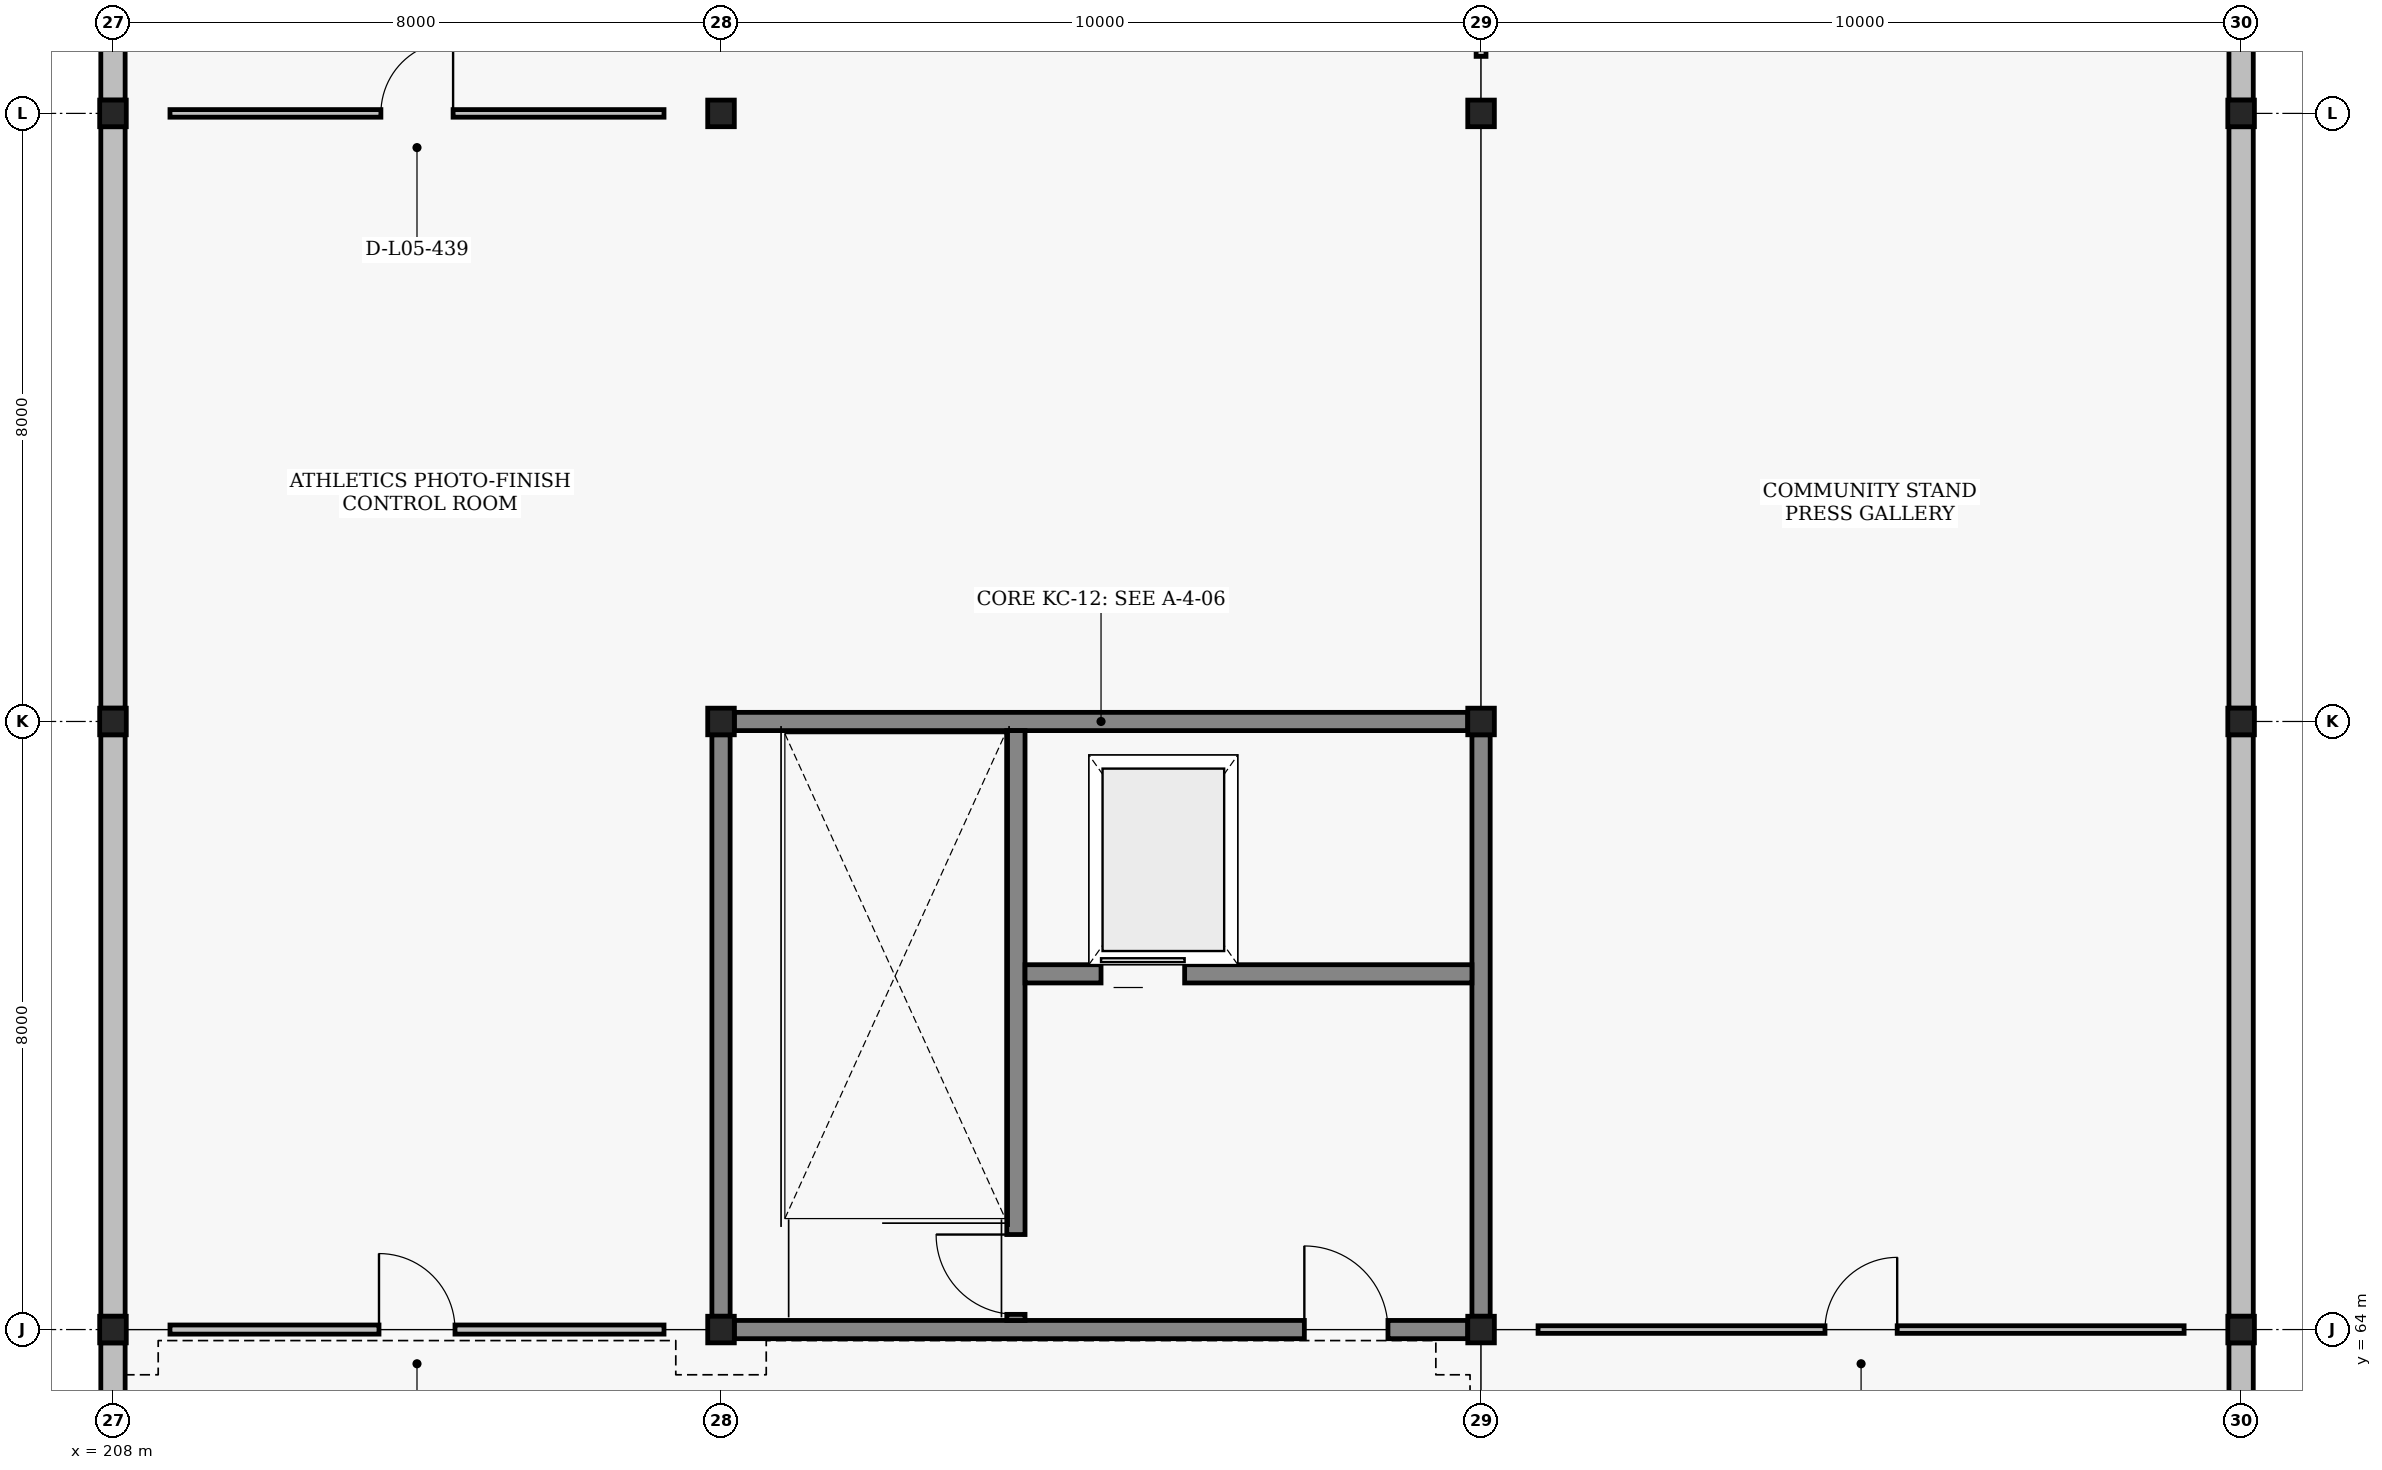
"""IFC4 building model, lengths in metres.
Left out: names, types, materials, properties, quantities, classifications, styles, units other than length and angle.
Written with IfcOpenShell. Run it as: python <this file> out.ifc"""

import sys

from ifc_helpers import new_model, si_unit, direction, frame, frame_2d, origin, origin_2d, place, context, subcontext, project, spatial, rectangle, hollow_rectangle, extrude, element, fill, save


model = new_model("IFC4")
c1 = context("Model", 3, precision=1e-05, world=origin(), true_north=direction((0.0, 1.0)))
c2 = subcontext(c1, "Body", "Model", "MODEL_VIEW")
j1 = project(units=[si_unit("LENGTHUNIT", "METRE"), si_unit("PLANEANGLEUNIT", "RADIAN")], contexts=[c1])
p1 = place(None, origin())
s1 = spatial("IfcSite", under=j1, at=p1, CompositionType="ELEMENT")
p2 = place(p1, origin())
s2 = spatial("IfcBuilding", under=s1, at=p2, CompositionType="ELEMENT")
p3 = place(p2, frame((0.0, 0.0, 18.6)))
s3 = spatial("IfcBuildingStorey", under=s2, at=p3, CompositionType="ELEMENT", Elevation=18.6)
for number, where, z_axis, x_axis in (
    (1, (208.0, 64.0, 0.0), (0.0, 0.0, 1.0), (1.0, 0.0, 0.0)),
    (2, (208.0, 72.0, 0.0), (0.0, 0.0, 1.0), (1.0, 0.0, 0.0)),
    (3, (208.0, 80.0, 0.0), (0.0, 0.0, 1.0), (1.0, 0.0, 0.0)),
    (4, (216.0, 64.0, 0.0), (0.0, 0.0, 1.0), (1.0, 0.0, 0.0)),
    (5, (216.0, 72.0, 0.0), (0.0, 0.0, 1.0), (1.0, 0.0, 0.0)),
    (6, (216.0, 80.0, 0.0), (0.0, 0.0, 1.0), (1.0, 0.0, 0.0)),
    (7, (226.0, 64.0, 0.0), (0.0, 0.0, 1.0), (1.0, 0.0, 0.0)),
    (8, (226.0, 72.0, 0.0), (0.0, 0.0, 1.0), (1.0, 0.0, 0.0)),
    (9, (226.0, 80.0, 0.0), (0.0, 0.0, 1.0), (1.0, 0.0, 0.0)),
    (10, (236.0, 64.0, 0.0), (0.0, 0.0, 1.0), (1.0, 0.0, 0.0)),
    (11, (236.0, 72.0, 0.0), (0.0, 0.0, 1.0), (1.0, 0.0, 0.0)),
    (12, (236.0, 80.0, 0.0), (0.0, 0.0, 1.0), (1.0, 0.0, 0.0)),
):
    element("IfcColumn", number, at=place(p3, frame(where, z_axis=z_axis, x_axis=x_axis)), inside=s3, PredefinedType="COLUMN", context=c2, shape_type="SweptSolid", body=[
        extrude(hollow_rectangle(XDim=0.35, YDim=0.35, WallThickness=0.016, at=origin_2d()), origin(), (0.0, 0.0, 1.0), 4.2),
    ])
for number, where, z_axis, x_axis in (
    (13, (208.0, 56.175, 0.0), (0.0, 0.0, 1.0), (0.0, 1.0, 0.0)),
    (14, (208.0, 64.175, 0.0), (0.0, 0.0, 1.0), (0.0, 1.0, 0.0)),
    (15, (208.0, 72.175, 0.0), (0.0, 0.0, 1.0), (0.0, 1.0, 0.0)),
    (16, (208.0, 80.175, 0.0), (0.0, 0.0, 1.0), (0.0, 1.0, 0.0)),
):
    element("IfcWall", number, at=place(p3, frame(where, z_axis=z_axis, x_axis=x_axis)), inside=s3, PredefinedType="SOLIDWALL", context=c2, shape_type="SweptSolid", body=[
        extrude(rectangle(XDim=7.65, YDim=0.32, at=frame_2d((3.825, 0.0))), origin(), (0.0, 0.0, 1.0), 3.35),
    ])
for number, where, z_axis, x_axis in (
    (17, (236.0, 56.175, 0.0), (0.0, 0.0, 1.0), (0.0, 1.0, 0.0)),
    (18, (236.0, 64.175, 0.0), (0.0, 0.0, 1.0), (0.0, 1.0, 0.0)),
    (19, (236.0, 72.175, 0.0), (0.0, 0.0, 1.0), (0.0, 1.0, 0.0)),
    (20, (236.0, 80.175, 0.0), (0.0, 0.0, 1.0), (0.0, 1.0, 0.0)),
):
    element("IfcWall", number, at=place(p3, frame(where, z_axis=z_axis, x_axis=x_axis)), inside=s3, PredefinedType="SOLIDWALL", context=c2, shape_type="SweptSolid", body=[
        extrude(rectangle(XDim=7.65, YDim=0.32, at=frame_2d((3.825, 0.0))), origin(), (0.0, 0.0, 1.0), 3.27),
    ])
p4 = place(p3, frame((216.175, 64.0, 0.0), z_axis=(0.0, 0.0, 1.0), x_axis=(1.0, 0.0, 0.0)))
e21 = element("IfcWall", 21, at=p4, inside=s3, PredefinedType="SHEAR", context=c2, shape_type="SweptSolid", body=[
    extrude(rectangle(XDim=9.65, YDim=0.24, at=frame_2d((4.825, 0.0))), origin(), (0.0, 0.0, 1.0), 3.27),
])
p5 = place(p4, frame((7.5, 0.0, 0.0)))
e22 = element("IfcOpeningElement", 22, at=p5, cuts=e21, PredefinedType="OPENING", context=c2, shape_type="SweptSolid", body=[
    extrude(rectangle(XDim=1.1, YDim=2.2, at=frame_2d((0.55, 1.1))), frame((0.0, 0.13, 0.0), z_axis=(0.0, -1.0, 0.0), x_axis=(1.0, 0.0, 0.0)), (0.0, 0.0, 1.0), 0.26),
])
p6 = place(p3, frame((216.175, 72.0, 0.0), z_axis=(0.0, 0.0, 1.0), x_axis=(1.0, 0.0, 0.0)))
e23 = element("IfcWall", 23, at=p6, inside=s3, PredefinedType="SHEAR", context=c2, shape_type="SweptSolid", body=[
    extrude(rectangle(XDim=9.65, YDim=0.24, at=frame_2d((4.825, 0.0))), origin(), (0.0, 0.0, 1.0), 3.27),
])
p7 = place(p3, frame((216.0, 64.175, 0.0), z_axis=(0.0, 0.0, 1.0), x_axis=(0.0, 1.0, 0.0)))
e24 = element("IfcWall", 24, at=p7, inside=s3, PredefinedType="SHEAR", context=c2, shape_type="SweptSolid", body=[
    extrude(rectangle(XDim=7.65, YDim=0.24, at=frame_2d((3.825, 0.0))), origin(), (0.0, 0.0, 1.0), 3.37),
])
p8 = place(p3, frame((226.0, 64.175, 0.0), z_axis=(0.0, 0.0, 1.0), x_axis=(0.0, 1.0, 0.0)))
e25 = element("IfcWall", 25, at=p8, inside=s3, PredefinedType="SHEAR", context=c2, shape_type="SweptSolid", body=[
    extrude(rectangle(XDim=7.65, YDim=0.24, at=frame_2d((3.825, 0.0))), origin(), (0.0, 0.0, 1.0), 3.27),
])
p9 = place(p3, frame((219.88, 64.12, 0.0), z_axis=(0.0, 0.0, 1.0), x_axis=(0.0, 1.0, 0.0)))
e26 = element("IfcWall", 26, at=p9, inside=s3, PredefinedType="SHEAR", context=c2, shape_type="SweptSolid", body=[
    extrude(rectangle(XDim=7.76, YDim=0.24, at=frame_2d((3.88, 0.0))), origin(), (0.0, 0.0, 1.0), 3.47),
])
p10 = place(p9, frame((0.08, 0.0, 0.0)))
e27 = element("IfcOpeningElement", 27, at=p10, cuts=e26, PredefinedType="OPENING", context=c2, shape_type="SweptSolid", body=[
    extrude(rectangle(XDim=1.05, YDim=2.15, at=frame_2d((0.525, 1.075))), frame((0.0, 0.13, 0.0), z_axis=(0.0, -1.0, 0.0), x_axis=(1.0, 0.0, 0.0)), (0.0, 0.0, 1.0), 0.26),
])
p11 = place(p3, frame((220.0, 68.68, 0.0), z_axis=(0.0, 0.0, 1.0), x_axis=(1.0, 0.0, 0.0)))
e28 = element("IfcWall", 28, at=p11, inside=s3, PredefinedType="SHEAR", context=c2, shape_type="SweptSolid", body=[
    extrude(rectangle(XDim=5.88, YDim=0.24, at=frame_2d((2.94, 0.0))), origin(), (0.0, 0.0, 1.0), 3.37),
])
p12 = place(p11, frame((1.0, 0.0, 0.0)))
e29 = element("IfcOpeningElement", 29, at=p12, cuts=e28, PredefinedType="OPENING", context=c2, shape_type="SweptSolid", body=[
    extrude(rectangle(XDim=1.1, YDim=2.15, at=frame_2d((0.55, 1.075))), frame((0.0, 0.13, 0.0), z_axis=(0.0, -1.0, 0.0), x_axis=(1.0, 0.0, 0.0)), (0.0, 0.0, 1.0), 0.26),
])
p13 = place(p3, frame((208.75, 64.0, 0.0), z_axis=(0.0, 0.0, 1.0), x_axis=(1.0, 0.0, 0.0)))
e30 = element("IfcWall", 30, at=p13, inside=s3, PredefinedType="PARTITIONING", context=c2, shape_type="SweptSolid", body=[
    extrude(rectangle(XDim=6.5, YDim=0.12, at=frame_2d((3.25, 0.0))), origin(), (0.0, 0.0, 1.0), 3.47),
])
p14 = place(p13, frame((2.75, 0.0, 0.0)))
e31 = element("IfcOpeningElement", 31, at=p14, cuts=e30, PredefinedType="OPENING", context=c2, shape_type="SweptSolid", body=[
    extrude(rectangle(XDim=1.0, YDim=2.1, at=frame_2d((0.5, 1.05))), frame((0.0, 0.07, 0.0), z_axis=(0.0, -1.0, 0.0), x_axis=(1.0, 0.0, 0.0)), (0.0, 0.0, 1.0), 0.14),
])
p15 = place(p3, frame((208.75, 80.0, 0.0), z_axis=(0.0, 0.0, 1.0), x_axis=(1.0, 0.0, 0.0)))
e32 = element("IfcWall", 32, at=p15, inside=s3, PredefinedType="PARTITIONING", context=c2, shape_type="SweptSolid", body=[
    extrude(rectangle(XDim=6.5, YDim=0.1, at=frame_2d((3.25, 0.0))), origin(), (0.0, 0.0, 1.0), 3.47),
])
p16 = place(p15, frame((2.775, 0.0, 0.0)))
e33 = element("IfcOpeningElement", 33, at=p16, cuts=e32, PredefinedType="OPENING", context=c2, shape_type="SweptSolid", body=[
    extrude(rectangle(XDim=0.95, YDim=2.1, at=frame_2d((0.475, 1.05))), frame((0.0, 0.06, 0.0), z_axis=(0.0, -1.0, 0.0), x_axis=(1.0, 0.0, 0.0)), (0.0, 0.0, 1.0), 0.12),
])
p17 = place(p3, frame((226.75, 64.0, 0.0), z_axis=(0.0, 0.0, 1.0), x_axis=(1.0, 0.0, 0.0)))
e34 = element("IfcWall", 34, at=p17, inside=s3, PredefinedType="PARTITIONING", context=c2, shape_type="SweptSolid", body=[
    extrude(rectangle(XDim=8.5, YDim=0.1, at=frame_2d((4.25, 0.0))), origin(), (0.0, 0.0, 1.0), 3.27),
])
p18 = place(p17, frame((3.775, 0.0, 0.0)))
e35 = element("IfcOpeningElement", 35, at=p18, cuts=e34, PredefinedType="OPENING", context=c2, shape_type="SweptSolid", body=[
    extrude(rectangle(XDim=0.95, YDim=2.1, at=frame_2d((0.475, 1.05))), frame((0.0, 0.06, 0.0), z_axis=(0.0, -1.0, 0.0), x_axis=(1.0, 0.0, 0.0)), (0.0, 0.0, 1.0), 0.12),
])
p19 = place(p3, frame((226.0, 80.75, 0.0), z_axis=(0.0, 0.0, 1.0), x_axis=(0.0, 1.0, 0.0)))
e36 = element("IfcWall", 36, at=p19, inside=s3, PredefinedType="PARTITIONING", context=c2, shape_type="SweptSolid", body=[
    extrude(rectangle(XDim=6.5, YDim=0.13, at=frame_2d((3.25, 0.0))), origin(), (0.0, 0.0, 1.0), 3.37),
])
p20 = place(p19, frame((2.75, 0.0, 0.0)))
e37 = element("IfcOpeningElement", 37, at=p20, cuts=e36, PredefinedType="OPENING", context=c2, shape_type="SweptSolid", body=[
    extrude(rectangle(XDim=1.0, YDim=2.1, at=frame_2d((0.5, 1.05))), frame((0.0, 0.075, 0.0), z_axis=(0.0, -1.0, 0.0), x_axis=(1.0, 0.0, 0.0)), (0.0, 0.0, 1.0), 0.15),
])
p21 = place(p5, origin())
e38 = element("IfcDoor", 38, at=p21, inside=s3, OperationType="SINGLE_SWING_LEFT", PredefinedType="DOOR", context=c2, shape_type="SweptSolid", body=[
    extrude(rectangle(XDim=1.1, YDim=2.2, at=frame_2d((0.55, 1.1))), frame((0.0, 0.025, 0.0), z_axis=(0.0, -1.0, 0.0), x_axis=(1.0, 0.0, 0.0)), (0.0, 0.0, 1.0), 0.05),
])
fill(e22, e38)
p22 = place(p10, origin())
e39 = element("IfcDoor", 39, at=p22, inside=s3, OperationType="SINGLE_SWING_RIGHT", PredefinedType="DOOR", context=c2, shape_type="SweptSolid", body=[
    extrude(rectangle(XDim=1.05, YDim=2.15, at=frame_2d((0.525, 1.075))), frame((0.0, 0.025, 0.0), z_axis=(0.0, -1.0, 0.0), x_axis=(1.0, 0.0, 0.0)), (0.0, 0.0, 1.0), 0.05),
])
fill(e27, e39)
p23 = place(p12, origin())
e40 = element("IfcDoor", 40, at=p23, inside=s3, OperationType="SLIDING_TO_LEFT", PredefinedType="DOOR", context=c2, shape_type="SweptSolid", body=[
    extrude(rectangle(XDim=1.1, YDim=2.15, at=frame_2d((0.55, 1.075))), frame((0.0, 0.025, 0.0), z_axis=(0.0, -1.0, 0.0), x_axis=(1.0, 0.0, 0.0)), (0.0, 0.0, 1.0), 0.05),
])
fill(e29, e40)
p24 = place(p14, origin())
e41 = element("IfcDoor", 41, at=p24, inside=s3, OperationType="SINGLE_SWING_LEFT", PredefinedType="DOOR", context=c2, shape_type="SweptSolid", body=[
    extrude(rectangle(XDim=1.0, YDim=2.1, at=frame_2d((0.5, 1.05))), frame((0.0, 0.025, 0.0), z_axis=(0.0, -1.0, 0.0), x_axis=(1.0, 0.0, 0.0)), (0.0, 0.0, 1.0), 0.05),
])
fill(e31, e41)
p25 = place(p16, origin())
e42 = element("IfcDoor", 42, at=p25, inside=s3, OperationType="SINGLE_SWING_RIGHT", PredefinedType="DOOR", context=c2, shape_type="SweptSolid", body=[
    extrude(rectangle(XDim=0.95, YDim=2.1, at=frame_2d((0.475, 1.05))), frame((0.0, 0.025, 0.0), z_axis=(0.0, -1.0, 0.0), x_axis=(1.0, 0.0, 0.0)), (0.0, 0.0, 1.0), 0.05),
])
fill(e33, e42)
p26 = place(p18, origin())
e43 = element("IfcDoor", 43, at=p26, inside=s3, OperationType="SINGLE_SWING_RIGHT", PredefinedType="DOOR", context=c2, shape_type="SweptSolid", body=[
    extrude(rectangle(XDim=0.95, YDim=2.1, at=frame_2d((0.475, 1.05))), frame((0.0, 0.025, 0.0), z_axis=(0.0, -1.0, 0.0), x_axis=(1.0, 0.0, 0.0)), (0.0, 0.0, 1.0), 0.05),
])
fill(e35, e43)
save(model, sys.argv[1])
